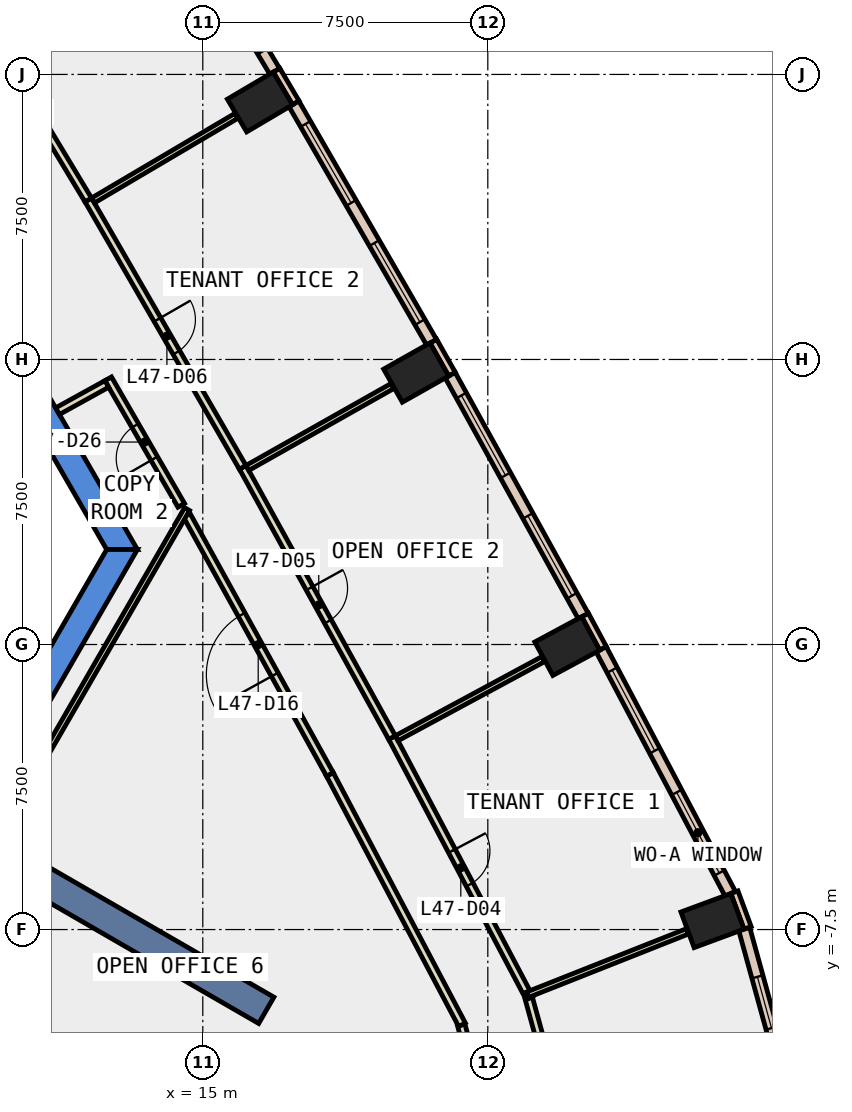
"""IFC4 building model, lengths in metres.
Left out: names, types, materials, properties, quantities, classifications, styles, units other than length and angle.
Written with IfcOpenShell. Run it as: python <this file> out.ifc"""

import sys

from ifc_helpers import new_model, si_unit, direction, frame, frame_2d, origin, origin_2d, place, context, subcontext, project, spatial, polyline, rectangle, outline, extrude, element, fill, save


model = new_model("IFC4")
c1 = context("Model", 3, precision=1e-05, world=origin(), true_north=direction((0.0, 1.0)))
c2 = subcontext(c1, "Body", "Model", "MODEL_VIEW")
j1 = project(units=[si_unit("LENGTHUNIT", "METRE"), si_unit("PLANEANGLEUNIT", "RADIAN")], contexts=[c1])
p1 = place(None, origin())
s1 = spatial("IfcSite", under=j1, at=p1, CompositionType="ELEMENT")
p2 = place(p1, origin())
s2 = spatial("IfcBuilding", under=s1, at=p2, CompositionType="ELEMENT")
p3 = place(p2, frame((0.0, 0.0, 210.8)))
s3 = spatial("IfcBuildingStorey", under=s2, at=p3, CompositionType="ELEMENT", Elevation=210.8)
for number, where, z_axis, x_axis in (
    (1, (28.412, -7.264, -0.4), (0.0, 0.0, 1.0), (-0.347, 0.938, 0.0)),
    (2, (24.591, -0.042, -0.4), (0.0, 0.0, 1.0), (-0.474, 0.88, 0.0)),
    (3, (20.615, 7.155, -0.4), (0.0, 0.0, 1.0), (-0.491, 0.871, 0.0)),
    (4, (16.504, 14.275, -0.4), (0.0, 0.0, 1.0), (-0.509, 0.861, 0.0)),
):
    element("IfcColumn", number, at=place(p3, frame(where, z_axis=z_axis, x_axis=x_axis)), inside=s3, PredefinedType="COLUMN", context=c2, shape_type="SweptSolid", body=[
        extrude(rectangle(XDim=1.0, YDim=1.4, at=origin_2d()), origin(), (0.0, 0.0, 1.0), 4.2),
    ])
p4 = place(p3, frame((0.0, 0.0, -0.4)))
e5 = element("IfcWall", 5, at=p4, inside=s3, PredefinedType="SHEAR", context=c2, shape_type="SweptSolid", body=[
    extrude(outline(polyline([(8.084, 11.498), (7.478, 11.148), (12.471, 2.5), (13.279, 2.5), (8.084, 11.498)])), origin(), (0.0, 0.0, 1.0), 4.2),
])
p5 = place(p3, frame((0.0, 0.0, -0.4)))
e6 = element("IfcWall", 6, at=p5, inside=s3, PredefinedType="SHEAR", context=c2, shape_type="SweptSolid", body=[
    extrude(outline(polyline([(6.64, -9.0), (13.279, 2.5), (12.471, 2.5), (6.235, -8.3), (6.64, -9.0)])), origin(), (0.0, 0.0, 1.0), 4.2),
])
p6 = place(p3, frame((8.877, -5.125, -0.4), z_axis=(0.0, 0.0, 1.0), x_axis=(0.866017533419, -0.500013631625, 0.0)))
e7 = element("IfcWall", 7, at=p6, inside=s3, PredefinedType="SHEAR", context=c2, shape_type="SweptSolid", body=[
    extrude(rectangle(XDim=9.0, YDim=0.8, at=frame_2d((4.5, 0.0))), origin(), (0.0, 0.0, 1.0), 4.2),
])
p7 = place(p3, frame((29.336, -7.456, 0.0), z_axis=(0.0, 0.0, 1.0), x_axis=(-0.346892928577, 0.937904737222, 0.0)))
e8 = element("IfcWall", 8, at=p7, inside=s3, PredefinedType="STANDARD", context=c2, shape_type="SweptSolid", body=[
    extrude(rectangle(XDim=1.0, YDim=0.2, at=frame_2d((0.5, 0.0))), origin(), (0.0, 0.0, 1.0), 3.8),
])
p8 = place(p3, frame((25.532, -0.103, 0.0), z_axis=(0.0, 0.0, 1.0), x_axis=(-0.473663196434, 0.88070606694, 0.0)))
e9 = element("IfcWall", 9, at=p8, inside=s3, PredefinedType="STANDARD", context=c2, shape_type="SweptSolid", body=[
    extrude(rectangle(XDim=1.0, YDim=0.2, at=frame_2d((0.5, 0.0))), origin(), (0.0, 0.0, 1.0), 3.8),
])
p9 = place(p3, frame((21.558, 7.112, 0.0), z_axis=(0.0, 0.0, 1.0), x_axis=(-0.492033129803, 0.870576475202, 0.0)))
e10 = element("IfcWall", 10, at=p9, inside=s3, PredefinedType="STANDARD", context=c2, shape_type="SweptSolid", body=[
    extrude(rectangle(XDim=1.0, YDim=0.2, at=frame_2d((0.5, 0.0))), origin(), (0.0, 0.0, 1.0), 3.8),
])
p10 = place(p3, frame((17.447, 14.252, 0.0), z_axis=(0.0, 0.0, 1.0), x_axis=(-0.508161541526, 0.861261776531, 0.0)))
e11 = element("IfcWall", 11, at=p10, inside=s3, PredefinedType="STANDARD", context=c2, shape_type="SweptSolid", body=[
    extrude(rectangle(XDim=1.0, YDim=0.2, at=frame_2d((0.5, 0.0))), origin(), (0.0, 0.0, 1.0), 3.8),
])
p11 = place(p3, frame((30.312, -11.35, 0.0), z_axis=(0.0, 0.0, 1.0), x_axis=(-0.265534577923, 0.96410133696, 0.0)))
e12 = element("IfcWall", 12, at=p11, inside=s3, PredefinedType="STANDARD", context=c2, shape_type="SweptSolid", body=[
    extrude(rectangle(XDim=4.007, YDim=0.3, at=frame_2d((2.003, 0.0))), origin(), (0.0, 0.0, 1.0), 3.8),
])
p12 = place(p11, frame((1.303, 0.0, 0.9)))
e13 = element("IfcOpeningElement", 13, at=p12, cuts=e12, PredefinedType="OPENING", context=c2, shape_type="SweptSolid", body=[
    extrude(rectangle(XDim=1.4, YDim=2.6, at=frame_2d((0.7, 1.3))), frame((0.0, 0.16, 0.0), z_axis=(0.0, -1.0, 0.0), x_axis=(1.0, 0.0, 0.0)), (0.0, 0.0, 1.0), 0.32),
])
p13 = place(p3, frame((28.879, -6.559, 0.0), z_axis=(0.0, 0.0, 1.0), x_axis=(-0.466789249342, 0.884368586449, 0.0)))
e14 = element("IfcWall", 14, at=p13, inside=s3, PredefinedType="STANDARD", context=c2, shape_type="SweptSolid", body=[
    extrude(rectangle(XDim=7.273, YDim=0.3, at=frame_2d((3.637, 0.0))), origin(), (0.0, 0.0, 1.0), 3.8),
])
p14 = place(p13, frame((0.618, 0.0, 0.9)))
e15 = element("IfcOpeningElement", 15, at=p14, cuts=e14, PredefinedType="OPENING", context=c2, shape_type="SweptSolid", body=[
    extrude(rectangle(XDim=2.4, YDim=2.6, at=frame_2d((1.2, 1.3))), frame((0.0, 0.16, 0.0), z_axis=(0.0, -1.0, 0.0), x_axis=(1.0, 0.0, 0.0)), (0.0, 0.0, 1.0), 0.32),
])
p15 = place(p13, frame((4.255, 0.0, 0.9)))
e16 = element("IfcOpeningElement", 16, at=p15, cuts=e14, PredefinedType="OPENING", context=c2, shape_type="SweptSolid", body=[
    extrude(rectangle(XDim=2.4, YDim=2.6, at=frame_2d((1.2, 1.3))), frame((0.0, 0.16, 0.0), z_axis=(0.0, -1.0, 0.0), x_axis=(1.0, 0.0, 0.0)), (0.0, 0.0, 1.0), 0.32),
])
p16 = place(p3, frame((25.01, 0.751, 0.0), z_axis=(0.0, 0.0, 1.0), x_axis=(-0.483590905878, 0.875294142419, 0.0)))
e17 = element("IfcWall", 17, at=p16, inside=s3, PredefinedType="STANDARD", context=c2, shape_type="SweptSolid", body=[
    extrude(rectangle(XDim=7.238, YDim=0.3, at=frame_2d((3.619, 0.0))), origin(), (0.0, 0.0, 1.0), 3.8),
])
p17 = place(p16, frame((0.609, 0.0, 0.9)))
e18 = element("IfcOpeningElement", 18, at=p17, cuts=e17, PredefinedType="OPENING", context=c2, shape_type="SweptSolid", body=[
    extrude(rectangle(XDim=2.4, YDim=2.6, at=frame_2d((1.2, 1.3))), frame((0.0, 0.16, 0.0), z_axis=(0.0, -1.0, 0.0), x_axis=(1.0, 0.0, 0.0)), (0.0, 0.0, 1.0), 0.32),
])
p18 = place(p16, frame((4.228, 0.0, 0.9)))
e19 = element("IfcOpeningElement", 19, at=p18, cuts=e17, PredefinedType="OPENING", context=c2, shape_type="SweptSolid", body=[
    extrude(rectangle(XDim=2.4, YDim=2.6, at=frame_2d((1.2, 1.3))), frame((0.0, 0.16, 0.0), z_axis=(0.0, -1.0, 0.0), x_axis=(1.0, 0.0, 0.0)), (0.0, 0.0, 1.0), 0.32),
])
p19 = place(p3, frame((21.019, 7.955, 0.0), z_axis=(0.0, 0.0, 1.0), x_axis=(-0.500012402131, 0.866018243292, 0.0)))
e20 = element("IfcWall", 20, at=p19, inside=s3, PredefinedType="STANDARD", context=c2, shape_type="SweptSolid", body=[
    extrude(rectangle(XDim=7.24, YDim=0.3, at=frame_2d((3.62, 0.0))), origin(), (0.0, 0.0, 1.0), 3.8),
])
p20 = place(p19, frame((0.61, 0.0, 0.9)))
e21 = element("IfcOpeningElement", 21, at=p20, cuts=e20, PredefinedType="OPENING", context=c2, shape_type="SweptSolid", body=[
    extrude(rectangle(XDim=2.4, YDim=2.6, at=frame_2d((1.2, 1.3))), frame((0.0, 0.16, 0.0), z_axis=(0.0, -1.0, 0.0), x_axis=(1.0, 0.0, 0.0)), (0.0, 0.0, 1.0), 0.32),
])
p21 = place(p19, frame((4.23, 0.0, 0.9)))
e22 = element("IfcOpeningElement", 22, at=p21, cuts=e20, PredefinedType="OPENING", context=c2, shape_type="SweptSolid", body=[
    extrude(rectangle(XDim=2.4, YDim=2.6, at=frame_2d((1.2, 1.3))), frame((0.0, 0.16, 0.0), z_axis=(0.0, -1.0, 0.0), x_axis=(1.0, 0.0, 0.0)), (0.0, 0.0, 1.0), 0.32),
])
p22 = place(p3, frame((16.892, 15.084, 0.0), z_axis=(0.0, 0.0, 1.0), x_axis=(-0.516230553484, 0.856449657394, 0.0)))
e23 = element("IfcWall", 23, at=p22, inside=s3, PredefinedType="STANDARD", context=c2, shape_type="SweptSolid", body=[
    extrude(rectangle(XDim=7.239, YDim=0.3, at=frame_2d((3.62, 0.0))), origin(), (0.0, 0.0, 1.0), 3.8),
])
p23 = place(p22, frame((0.61, 0.0, 0.9)))
e24 = element("IfcOpeningElement", 24, at=p23, cuts=e23, PredefinedType="OPENING", context=c2, shape_type="SweptSolid", body=[
    extrude(rectangle(XDim=2.4, YDim=2.6, at=frame_2d((1.2, 1.3))), frame((0.0, 0.16, 0.0), z_axis=(0.0, -1.0, 0.0), x_axis=(1.0, 0.0, 0.0)), (0.0, 0.0, 1.0), 0.32),
])
p24 = place(p22, frame((4.229, 0.0, 0.9)))
e25 = element("IfcOpeningElement", 25, at=p24, cuts=e23, PredefinedType="OPENING", context=c2, shape_type="SweptSolid", body=[
    extrude(rectangle(XDim=2.4, YDim=2.6, at=frame_2d((1.2, 1.3))), frame((0.0, 0.16, 0.0), z_axis=(0.0, -1.0, 0.0), x_axis=(1.0, 0.0, 0.0)), (0.0, 0.0, 1.0), 0.32),
])
p25 = place(p3, frame((14.433, 3.663, 0.0), z_axis=(0.0, 0.0, 1.0), x_axis=(-0.500149526678, 0.865939057303, 0.0)))
e26 = element("IfcWall", 26, at=p25, inside=s3, PredefinedType="PARTITIONING", context=c2, shape_type="SweptSolid", body=[
    extrude(rectangle(XDim=3.843, YDim=0.2, at=frame_2d((1.921, 0.0))), origin(), (0.0, 0.0, 1.0), 3.8),
])
p26 = place(p25, frame((1.422, 0.0, 0.0)))
e27 = element("IfcOpeningElement", 27, at=p26, cuts=e26, PredefinedType="OPENING", context=c2, shape_type="SweptSolid", body=[
    extrude(rectangle(XDim=1.0, YDim=2.1, at=frame_2d((0.5, 1.05))), frame((0.0, 0.11, 0.0), z_axis=(0.0, -1.0, 0.0), x_axis=(1.0, 0.0, 0.0)), (0.0, 0.0, 1.0), 0.22),
])
p27 = place(p3, frame((12.474, 6.856, 0.0), z_axis=(0.0, 0.0, 1.0), x_axis=(-0.875305814696, -0.483569778584, 0.0)))
e28 = element("IfcWall", 28, at=p27, inside=s3, PredefinedType="PARTITIONING", context=c2, shape_type="SweptSolid", body=[
    extrude(rectangle(XDim=1.481, YDim=0.2, at=frame_2d((0.74, 0.0))), origin(), (0.0, 0.0, 1.0), 3.8),
])
p28 = place(p3, frame((22.35, -12.006, 0.0), z_axis=(0.0, 0.0, 1.0), x_axis=(-0.265584627827, 0.964087550725, 0.0)))
e29 = element("IfcWall", 29, at=p28, inside=s3, PredefinedType="PARTITIONING", context=c2, shape_type="SweptSolid", body=[
    extrude(rectangle(XDim=2.067, YDim=0.2, at=frame_2d((1.034, 0.0))), origin(), (0.0, 0.0, 1.0), 3.8),
])
p29 = place(p3, frame((21.821, -10.005, 0.0), z_axis=(0.0, 0.0, 1.0), x_axis=(-0.466770012358, 0.884378739887, 0.0)))
e30 = element("IfcWall", 30, at=p29, inside=s3, PredefinedType="PARTITIONING", context=c2, shape_type="SweptSolid", body=[
    extrude(rectangle(XDim=7.449, YDim=0.2, at=frame_2d((3.725, 0.0))), origin(), (0.0, 0.0, 1.0), 3.8),
])
p30 = place(p3, frame((18.344, -3.417, 0.0), z_axis=(0.0, 0.0, 1.0), x_axis=(-0.483555501116, 0.875313702247, 0.0)))
e31 = element("IfcWall", 31, at=p30, inside=s3, PredefinedType="PARTITIONING", context=c2, shape_type="SweptSolid", body=[
    extrude(rectangle(XDim=7.801, YDim=0.2, at=frame_2d((3.9, 0.0))), origin(), (0.0, 0.0, 1.0), 3.8),
])
p31 = place(p30, frame((3.0, 0.0, 0.0)))
e32 = element("IfcOpeningElement", 32, at=p31, cuts=e31, PredefinedType="OPENING", context=c2, shape_type="SweptSolid", body=[
    extrude(rectangle(XDim=1.8, YDim=2.1, at=frame_2d((0.9, 1.05))), frame((0.0, 0.11, 0.0), z_axis=(0.0, -1.0, 0.0), x_axis=(1.0, 0.0, 0.0)), (0.0, 0.0, 1.0), 0.22),
])
p32 = place(p3, frame((23.578, -9.309, 0.0), z_axis=(0.0, 0.0, 1.0), x_axis=(0.265884037198, -0.964005020092, 0.0)))
e33 = element("IfcWall", 33, at=p32, inside=s3, PredefinedType="PARTITIONING", context=c2, shape_type="SweptSolid", body=[
    extrude(rectangle(XDim=2.784, YDim=0.2, at=frame_2d((1.392, 0.0))), origin(), (0.0, 0.0, 1.0), 3.8),
])
p33 = place(p3, frame((19.98, -2.448, 0.0), z_axis=(0.0, 0.0, 1.0), x_axis=(0.466864023915, -0.884329114738, 0.0)))
e34 = element("IfcWall", 34, at=p33, inside=s3, PredefinedType="PARTITIONING", context=c2, shape_type="SweptSolid", body=[
    extrude(rectangle(XDim=7.75, YDim=0.2, at=frame_2d((3.875, 0.0))), origin(), (0.0, 0.0, 1.0), 3.8),
])
p34 = place(p33, frame((3.375, 0.0, 0.0)))
e35 = element("IfcOpeningElement", 35, at=p34, cuts=e34, PredefinedType="OPENING", context=c2, shape_type="SweptSolid", body=[
    extrude(rectangle(XDim=1.0, YDim=2.1, at=frame_2d((0.5, 1.05))), frame((0.0, 0.11, 0.0), z_axis=(0.0, -1.0, 0.0), x_axis=(1.0, 0.0, 0.0)), (0.0, 0.0, 1.0), 0.22),
])
p35 = place(p3, frame((16.051, 4.663, 0.0), z_axis=(0.0, 0.0, 1.0), x_axis=(0.483513440344, -0.875336936846, 0.0)))
e36 = element("IfcWall", 36, at=p35, inside=s3, PredefinedType="PARTITIONING", context=c2, shape_type="SweptSolid", body=[
    extrude(rectangle(XDim=8.124, YDim=0.2, at=frame_2d((4.062, 0.0))), origin(), (0.0, 0.0, 1.0), 3.8),
])
p36 = place(p35, frame((3.637, 0.0, 0.0)))
e37 = element("IfcOpeningElement", 37, at=p36, cuts=e36, PredefinedType="OPENING", context=c2, shape_type="SweptSolid", body=[
    extrude(rectangle(XDim=1.0, YDim=2.1, at=frame_2d((0.5, 1.05))), frame((0.0, 0.11, 0.0), z_axis=(0.0, -1.0, 0.0), x_axis=(1.0, 0.0, 0.0)), (0.0, 0.0, 1.0), 0.22),
])
p37 = place(p3, frame((11.987, 11.698, 0.0), z_axis=(0.0, 0.0, 1.0), x_axis=(0.500075329254, -0.865981908051, 0.0)))
e38 = element("IfcWall", 38, at=p37, inside=s3, PredefinedType="PARTITIONING", context=c2, shape_type="SweptSolid", body=[
    extrude(rectangle(XDim=8.125, YDim=0.2, at=frame_2d((4.062, 0.0))), origin(), (0.0, 0.0, 1.0), 3.8),
])
p38 = place(p37, frame((3.637, 0.0, 0.0)))
e39 = element("IfcOpeningElement", 39, at=p38, cuts=e38, PredefinedType="OPENING", context=c2, shape_type="SweptSolid", body=[
    extrude(rectangle(XDim=1.0, YDim=2.1, at=frame_2d((0.5, 1.05))), frame((0.0, 0.11, 0.0), z_axis=(0.0, -1.0, 0.0), x_axis=(1.0, 0.0, 0.0)), (0.0, 0.0, 1.0), 0.22),
])
p39 = place(p3, frame((7.792, 18.655, 0.0), z_axis=(0.0, 0.0, 1.0), x_axis=(0.516293428925, -0.856411755669, 0.0)))
e40 = element("IfcWall", 40, at=p39, inside=s3, PredefinedType="PARTITIONING", context=c2, shape_type="SweptSolid", body=[
    extrude(rectangle(XDim=8.124, YDim=0.2, at=frame_2d((4.062, 0.0))), origin(), (0.0, 0.0, 1.0), 3.8),
])
p40 = place(p39, frame((3.637, 0.0, 0.0)))
e41 = element("IfcOpeningElement", 41, at=p40, cuts=e40, PredefinedType="OPENING", context=c2, shape_type="SweptSolid", body=[
    extrude(rectangle(XDim=1.0, YDim=2.1, at=frame_2d((0.5, 1.05))), frame((0.0, 0.11, 0.0), z_axis=(0.0, -1.0, 0.0), x_axis=(1.0, 0.0, 0.0)), (0.0, 0.0, 1.0), 0.22),
])
p41 = place(p3, frame((23.552, -9.212, 0.0), z_axis=(0.0, 0.0, 1.0), x_axis=(0.929720624715, 0.368265610639, 0.0)))
e42 = element("IfcWall", 42, at=p41, inside=s3, PredefinedType="PARTITIONING", context=c2, shape_type="SweptSolid", body=[
    extrude(rectangle(XDim=4.515, YDim=0.15, at=frame_2d((2.258, 0.0))), origin(), (0.0, 0.0, 1.0), 3.8),
])
p42 = place(p3, frame((20.103, -2.466, 0.0), z_axis=(0.0, 0.0, 1.0), x_axis=(0.879965969606, 0.475036727354, 0.0)))
e43 = element("IfcWall", 43, at=p42, inside=s3, PredefinedType="PARTITIONING", context=c2, shape_type="SweptSolid", body=[
    extrude(rectangle(XDim=4.381, YDim=0.15, at=frame_2d((2.19, 0.0))), origin(), (0.0, 0.0, 1.0), 3.8),
])
p43 = place(p3, frame((16.174, 4.646, 0.0), z_axis=(0.0, 0.0, 1.0), x_axis=(0.870725770229, 0.491768881752, 0.0)))
e44 = element("IfcWall", 44, at=p43, inside=s3, PredefinedType="PARTITIONING", context=c2, shape_type="SweptSolid", body=[
    extrude(rectangle(XDim=4.38, YDim=0.15, at=frame_2d((2.19, 0.0))), origin(), (0.0, 0.0, 1.0), 3.8),
])
p44 = place(p3, frame((12.111, 11.684, 0.0), z_axis=(0.0, 0.0, 1.0), x_axis=(0.861290233547, 0.508113307833, 0.0)))
e45 = element("IfcWall", 45, at=p44, inside=s3, PredefinedType="PARTITIONING", context=c2, shape_type="SweptSolid", body=[
    extrude(rectangle(XDim=4.381, YDim=0.15, at=frame_2d((2.19, 0.0))), origin(), (0.0, 0.0, 1.0), 3.8),
])
p45 = place(p3, frame((9.597, -5.079, 0.0), z_axis=(0.0, 0.0, 1.0), x_axis=(0.499962477963, 0.866047066059, 0.0)))
e46 = element("IfcWall", 46, at=p45, inside=s3, PredefinedType="PARTITIONING", context=c2, shape_type="SweptSolid", body=[
    extrude(rectangle(XDim=9.979, YDim=0.15, at=frame_2d((4.989, 0.0))), origin(), (0.0, 0.0, 1.0), 3.8),
])
p46 = place(p12, origin())
e47 = element("IfcWindow", 47, at=p46, inside=s3, PartitioningType="SINGLE_PANEL", PredefinedType="WINDOW", context=c2, shape_type="SweptSolid", body=[
    extrude(rectangle(XDim=1.4, YDim=2.6, at=frame_2d((0.7, 1.3))), frame((0.0, 0.03, 0.0), z_axis=(0.0, -1.0, 0.0), x_axis=(1.0, 0.0, 0.0)), (0.0, 0.0, 1.0), 0.06),
])
fill(e13, e47)
p47 = place(p14, origin())
e48 = element("IfcWindow", 48, at=p47, inside=s3, PartitioningType="SINGLE_PANEL", PredefinedType="WINDOW", context=c2, shape_type="SweptSolid", body=[
    extrude(rectangle(XDim=2.4, YDim=2.6, at=frame_2d((1.2, 1.3))), frame((0.0, 0.03, 0.0), z_axis=(0.0, -1.0, 0.0), x_axis=(1.0, 0.0, 0.0)), (0.0, 0.0, 1.0), 0.06),
])
fill(e15, e48)
p48 = place(p15, origin())
e49 = element("IfcWindow", 49, at=p48, inside=s3, PartitioningType="SINGLE_PANEL", PredefinedType="WINDOW", context=c2, shape_type="SweptSolid", body=[
    extrude(rectangle(XDim=2.4, YDim=2.6, at=frame_2d((1.2, 1.3))), frame((0.0, 0.03, 0.0), z_axis=(0.0, -1.0, 0.0), x_axis=(1.0, 0.0, 0.0)), (0.0, 0.0, 1.0), 0.06),
])
fill(e16, e49)
p49 = place(p17, origin())
e50 = element("IfcWindow", 50, at=p49, inside=s3, PartitioningType="SINGLE_PANEL", PredefinedType="WINDOW", context=c2, shape_type="SweptSolid", body=[
    extrude(rectangle(XDim=2.4, YDim=2.6, at=frame_2d((1.2, 1.3))), frame((0.0, 0.03, 0.0), z_axis=(0.0, -1.0, 0.0), x_axis=(1.0, 0.0, 0.0)), (0.0, 0.0, 1.0), 0.06),
])
fill(e18, e50)
p50 = place(p18, origin())
e51 = element("IfcWindow", 51, at=p50, inside=s3, PartitioningType="SINGLE_PANEL", PredefinedType="WINDOW", context=c2, shape_type="SweptSolid", body=[
    extrude(rectangle(XDim=2.4, YDim=2.6, at=frame_2d((1.2, 1.3))), frame((0.0, 0.03, 0.0), z_axis=(0.0, -1.0, 0.0), x_axis=(1.0, 0.0, 0.0)), (0.0, 0.0, 1.0), 0.06),
])
fill(e19, e51)
p51 = place(p20, origin())
e52 = element("IfcWindow", 52, at=p51, inside=s3, PartitioningType="SINGLE_PANEL", PredefinedType="WINDOW", context=c2, shape_type="SweptSolid", body=[
    extrude(rectangle(XDim=2.4, YDim=2.6, at=frame_2d((1.2, 1.3))), frame((0.0, 0.03, 0.0), z_axis=(0.0, -1.0, 0.0), x_axis=(1.0, 0.0, 0.0)), (0.0, 0.0, 1.0), 0.06),
])
fill(e21, e52)
p52 = place(p21, origin())
e53 = element("IfcWindow", 53, at=p52, inside=s3, PartitioningType="SINGLE_PANEL", PredefinedType="WINDOW", context=c2, shape_type="SweptSolid", body=[
    extrude(rectangle(XDim=2.4, YDim=2.6, at=frame_2d((1.2, 1.3))), frame((0.0, 0.03, 0.0), z_axis=(0.0, -1.0, 0.0), x_axis=(1.0, 0.0, 0.0)), (0.0, 0.0, 1.0), 0.06),
])
fill(e22, e53)
p53 = place(p34, origin())
e54 = element("IfcDoor", 54, at=p53, inside=s3, OperationType="SINGLE_SWING_LEFT", PredefinedType="DOOR", context=c2, shape_type="SweptSolid", body=[
    extrude(rectangle(XDim=1.0, YDim=2.1, at=frame_2d((0.5, 1.05))), frame((0.0, 0.025, 0.0), z_axis=(0.0, -1.0, 0.0), x_axis=(1.0, 0.0, 0.0)), (0.0, 0.0, 1.0), 0.05),
])
fill(e35, e54)
p54 = place(p36, origin())
e55 = element("IfcDoor", 55, at=p54, inside=s3, OperationType="SINGLE_SWING_RIGHT", PredefinedType="DOOR", context=c2, shape_type="SweptSolid", body=[
    extrude(rectangle(XDim=1.0, YDim=2.1, at=frame_2d((0.5, 1.05))), frame((0.0, 0.025, 0.0), z_axis=(0.0, -1.0, 0.0), x_axis=(1.0, 0.0, 0.0)), (0.0, 0.0, 1.0), 0.05),
])
fill(e37, e55)
p55 = place(p38, origin())
e56 = element("IfcDoor", 56, at=p55, inside=s3, OperationType="SINGLE_SWING_RIGHT", PredefinedType="DOOR", context=c2, shape_type="SweptSolid", body=[
    extrude(rectangle(XDim=1.0, YDim=2.1, at=frame_2d((0.5, 1.05))), frame((0.0, 0.025, 0.0), z_axis=(0.0, -1.0, 0.0), x_axis=(1.0, 0.0, 0.0)), (0.0, 0.0, 1.0), 0.05),
])
fill(e39, e56)
p56 = place(p31, origin())
e57 = element("IfcDoor", 57, at=p56, inside=s3, OperationType="DOUBLE_DOOR_SINGLE_SWING", PredefinedType="DOOR", context=c2, shape_type="SweptSolid", body=[
    extrude(rectangle(XDim=1.8, YDim=2.1, at=frame_2d((0.9, 1.05))), frame((0.0, 0.025, 0.0), z_axis=(0.0, -1.0, 0.0), x_axis=(1.0, 0.0, 0.0)), (0.0, 0.0, 1.0), 0.05),
])
fill(e32, e57)
p57 = place(p26, origin())
e58 = element("IfcDoor", 58, at=p57, inside=s3, OperationType="SINGLE_SWING_RIGHT", PredefinedType="DOOR", context=c2, shape_type="SweptSolid", body=[
    extrude(rectangle(XDim=1.0, YDim=2.1, at=frame_2d((0.5, 1.05))), frame((0.0, 0.025, 0.0), z_axis=(0.0, -1.0, 0.0), x_axis=(1.0, 0.0, 0.0)), (0.0, 0.0, 1.0), 0.05),
])
fill(e27, e58)
save(model, sys.argv[1])
